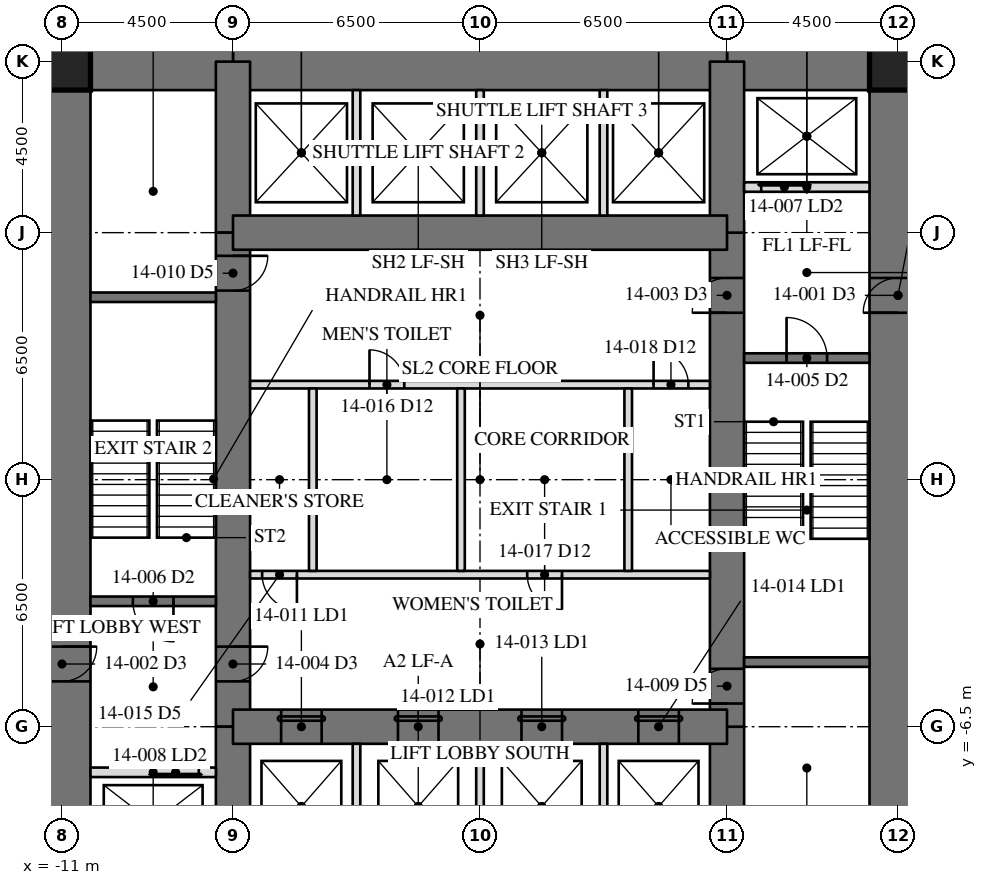
"""IFC4 building model, lengths in metres.
Left out: names, types, materials, properties, quantities, classifications, styles, units other than length and angle.
Written with IfcOpenShell. Run it as: python <this file> out.ifc"""

import sys

from ifc_helpers import new_model, si_unit, direction, frame, frame_2d, origin, origin_2d, place, context, subcontext, project, spatial, rectangle, hollow_rectangle, extrude, element, fill, save


model = new_model("IFC4")
c1 = context("Model", 3, precision=1e-05, world=origin(), true_north=direction((0.0, 1.0)))
c2 = subcontext(c1, "Body", "Model", "MODEL_VIEW")
j1 = project(units=[si_unit("LENGTHUNIT", "METRE"), si_unit("PLANEANGLEUNIT", "RADIAN")], contexts=[c1])
p1 = place(None, origin())
s1 = spatial("IfcSite", under=j1, at=p1, CompositionType="ELEMENT")
p2 = place(p1, origin())
s2 = spatial("IfcBuilding", under=s1, at=p2, CompositionType="ELEMENT")
p3 = place(p2, frame((0.0, 0.0, 61.1)))
s3 = spatial("IfcBuildingStorey", under=s2, at=p3, CompositionType="ELEMENT", Elevation=61.1)
p4 = place(p3, frame((11.0, -11.0, 0.0), z_axis=(0.0, 0.0, 1.0), x_axis=(0.0, 1.0, 0.0)))
e1 = element("IfcWall", 1, at=p4, inside=s3, PredefinedType="SHEAR", context=c2, shape_type="SweptSolid", body=[
    extrude(rectangle(XDim=22.0, YDim=1.5, at=frame_2d((11.0, 0.0))), origin(), (0.0, 0.0, 1.0), 4.1),
])
p5 = place(p4, frame((15.393, 0.0, 0.0)))
e2 = element("IfcOpeningElement", 2, at=p5, cuts=e1, PredefinedType="OPENING", context=c2, shape_type="SweptSolid", body=[
    extrude(rectangle(XDim=0.915, YDim=2.134, at=frame_2d((0.458, 1.067))), frame((0.0, 0.76, 0.0), z_axis=(0.0, -1.0, 0.0), x_axis=(1.0, 0.0, 0.0)), (0.0, 0.0, 1.0), 1.52),
])
p6 = place(p3, frame((-11.0, 11.0, 0.0), z_axis=(0.0, 0.0, 1.0), x_axis=(0.0, -1.0, 0.0)))
e3 = element("IfcWall", 3, at=p6, inside=s3, PredefinedType="SHEAR", context=c2, shape_type="SweptSolid", body=[
    extrude(rectangle(XDim=22.0, YDim=1.5, at=frame_2d((11.0, 0.0))), origin(), (0.0, 0.0, 1.0), 4.1),
])
p7 = place(p6, frame((15.393, 0.0, 0.0)))
e4 = element("IfcOpeningElement", 4, at=p7, cuts=e3, PredefinedType="OPENING", context=c2, shape_type="SweptSolid", body=[
    extrude(rectangle(XDim=0.915, YDim=2.134, at=frame_2d((0.458, 1.067))), frame((0.0, 0.76, 0.0), z_axis=(0.0, -1.0, 0.0), x_axis=(1.0, 0.0, 0.0)), (0.0, 0.0, 1.0), 1.52),
])
p8 = place(p3, frame((11.0, 11.0, 0.0), z_axis=(0.0, 0.0, 1.0), x_axis=(-1.0, 0.0, 0.0)))
e5 = element("IfcWall", 5, at=p8, inside=s3, PredefinedType="SHEAR", context=c2, shape_type="SweptSolid", body=[
    extrude(rectangle(XDim=4.5, YDim=1.5, at=frame_2d((2.25, 0.0))), origin(), (0.0, 0.0, 1.0), 4.1),
])
p9 = place(p3, frame((6.5, 11.0, 0.0), z_axis=(0.0, 0.0, 1.0), x_axis=(-1.0, 0.0, 0.0)))
e6 = element("IfcWall", 6, at=p9, inside=s3, PredefinedType="SHEAR", context=c2, shape_type="SweptSolid", body=[
    extrude(rectangle(XDim=13.0, YDim=1.5, at=frame_2d((6.5, 0.0))), origin(), (0.0, 0.0, 1.0), 4.1),
])
p10 = place(p3, frame((-6.5, 11.0, 0.0), z_axis=(0.0, 0.0, 1.0), x_axis=(-1.0, 0.0, 0.0)))
e7 = element("IfcWall", 7, at=p10, inside=s3, PredefinedType="SHEAR", context=c2, shape_type="SweptSolid", body=[
    extrude(rectangle(XDim=4.5, YDim=1.5, at=frame_2d((2.25, 0.0))), origin(), (0.0, 0.0, 1.0), 4.1),
])
p11 = place(p3, frame((6.5, -11.0, 0.0), z_axis=(0.0, 0.0, 1.0), x_axis=(0.0, 1.0, 0.0)))
e8 = element("IfcWall", 8, at=p11, inside=s3, PredefinedType="SHEAR", context=c2, shape_type="SweptSolid", body=[
    extrude(rectangle(XDim=4.5, YDim=0.9, at=frame_2d((2.25, 0.0))), origin(), (0.0, 0.0, 1.0), 4.1),
])
p12 = place(p3, frame((6.5, -6.5, 0.0), z_axis=(0.0, 0.0, 1.0), x_axis=(0.0, 1.0, 0.0)))
e9 = element("IfcWall", 9, at=p12, inside=s3, PredefinedType="SHEAR", context=c2, shape_type="SweptSolid", body=[
    extrude(rectangle(XDim=13.0, YDim=0.9, at=frame_2d((6.5, 0.0))), origin(), (0.0, 0.0, 1.0), 4.1),
])
p13 = place(p12, frame((10.893, 0.0, 0.0)))
e10 = element("IfcOpeningElement", 10, at=p13, cuts=e9, PredefinedType="OPENING", context=c2, shape_type="SweptSolid", body=[
    extrude(rectangle(XDim=0.915, YDim=2.134, at=frame_2d((0.458, 1.067))), frame((0.0, 0.46, 0.0), z_axis=(0.0, -1.0, 0.0), x_axis=(1.0, 0.0, 0.0)), (0.0, 0.0, 1.0), 0.92),
])
p14 = place(p12, frame((0.61, 0.0, 0.0)))
e11 = element("IfcOpeningElement", 11, at=p14, cuts=e9, PredefinedType="OPENING", context=c2, shape_type="SweptSolid", body=[
    extrude(rectangle(XDim=0.915, YDim=2.134, at=frame_2d((0.458, 1.067))), frame((0.0, 0.46, 0.0), z_axis=(0.0, -1.0, 0.0), x_axis=(1.0, 0.0, 0.0)), (0.0, 0.0, 1.0), 0.92),
])
for number, where, z_axis, x_axis in (
    (12, (6.5, 6.5, 0.0), (0.0, 0.0, 1.0), (0.0, 1.0, 0.0)),
    (13, (-6.5, 11.0, 0.0), (0.0, 0.0, 1.0), (0.0, -1.0, 0.0)),
):
    element("IfcWall", number, at=place(p3, frame(where, z_axis=z_axis, x_axis=x_axis)), inside=s3, PredefinedType="SHEAR", context=c2, shape_type="SweptSolid", body=[
        extrude(rectangle(XDim=4.5, YDim=0.9, at=frame_2d((2.25, 0.0))), origin(), (0.0, 0.0, 1.0), 4.1),
    ])
p15 = place(p3, frame((-6.5, 6.5, 0.0), z_axis=(0.0, 0.0, 1.0), x_axis=(0.0, -1.0, 0.0)))
e14 = element("IfcWall", 14, at=p15, inside=s3, PredefinedType="SHEAR", context=c2, shape_type="SweptSolid", body=[
    extrude(rectangle(XDim=13.0, YDim=0.9, at=frame_2d((6.5, 0.0))), origin(), (0.0, 0.0, 1.0), 4.1),
])
p16 = place(p15, frame((10.893, 0.0, 0.0)))
e15 = element("IfcOpeningElement", 15, at=p16, cuts=e14, PredefinedType="OPENING", context=c2, shape_type="SweptSolid", body=[
    extrude(rectangle(XDim=0.915, YDim=2.134, at=frame_2d((0.458, 1.067))), frame((0.0, 0.46, 0.0), z_axis=(0.0, -1.0, 0.0), x_axis=(1.0, 0.0, 0.0)), (0.0, 0.0, 1.0), 0.92),
])
p17 = place(p15, frame((0.61, 0.0, 0.0)))
e16 = element("IfcOpeningElement", 16, at=p17, cuts=e14, PredefinedType="OPENING", context=c2, shape_type="SweptSolid", body=[
    extrude(rectangle(XDim=0.915, YDim=2.134, at=frame_2d((0.458, 1.067))), frame((0.0, 0.46, 0.0), z_axis=(0.0, -1.0, 0.0), x_axis=(1.0, 0.0, 0.0)), (0.0, 0.0, 1.0), 0.92),
])
p18 = place(p3, frame((-6.5, -6.5, 0.0), z_axis=(0.0, 0.0, 1.0), x_axis=(0.0, -1.0, 0.0)))
e17 = element("IfcWall", 17, at=p18, inside=s3, PredefinedType="SHEAR", context=c2, shape_type="SweptSolid", body=[
    extrude(rectangle(XDim=4.5, YDim=0.9, at=frame_2d((2.25, 0.0))), origin(), (0.0, 0.0, 1.0), 4.1),
])
p19 = place(p3, frame((6.5, 6.5, 0.0), z_axis=(0.0, 0.0, 1.0), x_axis=(-1.0, 0.0, 0.0)))
e18 = element("IfcWall", 18, at=p19, inside=s3, PredefinedType="SHEAR", context=c2, shape_type="SweptSolid", body=[
    extrude(rectangle(XDim=13.0, YDim=0.9, at=frame_2d((6.5, 0.0))), origin(), (0.0, 0.0, 1.0), 4.1),
])
p20 = place(p3, frame((-6.5, -6.5, 0.0), z_axis=(0.0, 0.0, 1.0), x_axis=(1.0, 0.0, 0.0)))
e19 = element("IfcWall", 19, at=p20, inside=s3, PredefinedType="SHEAR", context=c2, shape_type="SweptSolid", body=[
    extrude(rectangle(XDim=13.0, YDim=0.9, at=frame_2d((6.5, 0.0))), origin(), (0.0, 0.0, 1.0), 4.1),
])
p21 = place(p20, frame((1.267, 0.0, 0.0)))
e20 = element("IfcOpeningElement", 20, at=p21, cuts=e19, PredefinedType="OPENING", context=c2, shape_type="SweptSolid", body=[
    extrude(rectangle(XDim=1.067, YDim=2.134, at=frame_2d((0.533, 1.067))), frame((0.0, 0.46, 0.0), z_axis=(0.0, -1.0, 0.0), x_axis=(1.0, 0.0, 0.0)), (0.0, 0.0, 1.0), 0.92),
])
p22 = place(p20, frame((4.342, 0.0, 0.0)))
e21 = element("IfcOpeningElement", 21, at=p22, cuts=e19, PredefinedType="OPENING", context=c2, shape_type="SweptSolid", body=[
    extrude(rectangle(XDim=1.067, YDim=2.134, at=frame_2d((0.533, 1.067))), frame((0.0, 0.46, 0.0), z_axis=(0.0, -1.0, 0.0), x_axis=(1.0, 0.0, 0.0)), (0.0, 0.0, 1.0), 0.92),
])
p23 = place(p20, frame((7.592, 0.0, 0.0)))
e22 = element("IfcOpeningElement", 22, at=p23, cuts=e19, PredefinedType="OPENING", context=c2, shape_type="SweptSolid", body=[
    extrude(rectangle(XDim=1.067, YDim=2.134, at=frame_2d((0.533, 1.067))), frame((0.0, 0.46, 0.0), z_axis=(0.0, -1.0, 0.0), x_axis=(1.0, 0.0, 0.0)), (0.0, 0.0, 1.0), 0.92),
])
p24 = place(p20, frame((10.667, 0.0, 0.0)))
e23 = element("IfcOpeningElement", 23, at=p24, cuts=e19, PredefinedType="OPENING", context=c2, shape_type="SweptSolid", body=[
    extrude(rectangle(XDim=1.067, YDim=2.134, at=frame_2d((0.533, 1.067))), frame((0.0, 0.46, 0.0), z_axis=(0.0, -1.0, 0.0), x_axis=(1.0, 0.0, 0.0)), (0.0, 0.0, 1.0), 0.92),
])
for number, where, z_axis, x_axis in (
    (24, (11.0, 11.0, 0.0), (0.0, 0.0, 1.0), (1.0, 0.0, 0.0)),
    (25, (-11.0, 11.0, 0.0), (0.0, 0.0, 1.0), (1.0, 0.0, 0.0)),
):
    element("IfcColumn", number, at=place(p3, frame(where, z_axis=z_axis, x_axis=x_axis)), inside=s3, PredefinedType="COLUMN", context=c2, shape_type="SweptSolid", body=[
        extrude(hollow_rectangle(XDim=1.499, YDim=1.499, WallThickness=0.102, at=origin_2d()), origin(), (0.0, 0.0, 1.0), 4.1),
    ])
for number, where, z_axis, x_axis in (
    (26, (6.95, -4.8, 0.0), (0.0, 0.0, 1.0), (1.0, 0.0, 0.0)),
    (27, (-6.95, 4.8, 0.0), (0.0, 0.0, 1.0), (-1.0, 0.0, 0.0)),
):
    element("IfcWall", number, at=place(p3, frame(where, z_axis=z_axis, x_axis=x_axis)), inside=s3, PredefinedType="SOLIDWALL", context=c2, shape_type="SweptSolid", body=[
        extrude(rectangle(XDim=3.3, YDim=0.25, at=frame_2d((1.65, 0.0))), origin(), (0.0, 0.0, 1.0), 3.91),
    ])
p25 = place(p3, frame((6.95, 3.2, 0.0), z_axis=(0.0, 0.0, 1.0), x_axis=(1.0, 0.0, 0.0)))
e28 = element("IfcWall", 28, at=p25, inside=s3, PredefinedType="SOLIDWALL", context=c2, shape_type="SweptSolid", body=[
    extrude(rectangle(XDim=3.3, YDim=0.25, at=frame_2d((1.65, 0.0))), origin(), (0.0, 0.0, 1.0), 3.91),
])
p26 = place(p25, frame((1.116, 0.0, 0.0)))
e29 = element("IfcOpeningElement", 29, at=p26, cuts=e28, PredefinedType="OPENING", context=c2, shape_type="SweptSolid", body=[
    extrude(rectangle(XDim=1.067, YDim=2.134, at=frame_2d((0.533, 1.067))), frame((0.0, 0.135, 0.0), z_axis=(0.0, -1.0, 0.0), x_axis=(1.0, 0.0, 0.0)), (0.0, 0.0, 1.0), 0.27),
])
p27 = place(p3, frame((-6.95, -3.2, 0.0), z_axis=(0.0, 0.0, 1.0), x_axis=(-1.0, 0.0, 0.0)))
e30 = element("IfcWall", 30, at=p27, inside=s3, PredefinedType="SOLIDWALL", context=c2, shape_type="SweptSolid", body=[
    extrude(rectangle(XDim=3.3, YDim=0.25, at=frame_2d((1.65, 0.0))), origin(), (0.0, 0.0, 1.0), 3.91),
])
p28 = place(p27, frame((1.116, 0.0, 0.0)))
e31 = element("IfcOpeningElement", 31, at=p28, cuts=e30, PredefinedType="OPENING", context=c2, shape_type="SweptSolid", body=[
    extrude(rectangle(XDim=1.067, YDim=2.134, at=frame_2d((0.533, 1.067))), frame((0.0, 0.135, 0.0), z_axis=(0.0, -1.0, 0.0), x_axis=(1.0, 0.0, 0.0)), (0.0, 0.0, 1.0), 0.27),
])
p29 = place(p3, frame((6.95, 7.7, 0.0), z_axis=(0.0, 0.0, 1.0), x_axis=(1.0, 0.0, 0.0)))
e32 = element("IfcWall", 32, at=p29, inside=s3, PredefinedType="PARTITIONING", context=c2, shape_type="SweptSolid", body=[
    extrude(rectangle(XDim=3.3, YDim=0.25, at=frame_2d((1.65, 0.0))), origin(), (0.0, 0.0, 1.0), 3.91),
])
p30 = place(p29, frame((0.45, 0.0, 0.0)))
e33 = element("IfcOpeningElement", 33, at=p30, cuts=e32, PredefinedType="OPENING", context=c2, shape_type="SweptSolid", body=[
    extrude(rectangle(XDim=1.219, YDim=2.134, at=frame_2d((0.609, 1.067))), frame((0.0, 0.135, 0.0), z_axis=(0.0, -1.0, 0.0), x_axis=(1.0, 0.0, 0.0)), (0.0, 0.0, 1.0), 0.27),
])
p31 = place(p3, frame((-6.95, -7.7, 0.0), z_axis=(0.0, 0.0, 1.0), x_axis=(-1.0, 0.0, 0.0)))
e34 = element("IfcWall", 34, at=p31, inside=s3, PredefinedType="PARTITIONING", context=c2, shape_type="SweptSolid", body=[
    extrude(rectangle(XDim=3.3, YDim=0.25, at=frame_2d((1.65, 0.0))), origin(), (0.0, 0.0, 1.0), 3.91),
])
p32 = place(p31, frame((0.45, 0.0, 0.0)))
e35 = element("IfcOpeningElement", 35, at=p32, cuts=e34, PredefinedType="OPENING", context=c2, shape_type="SweptSolid", body=[
    extrude(rectangle(XDim=1.219, YDim=2.134, at=frame_2d((0.609, 1.067))), frame((0.0, 0.135, 0.0), z_axis=(0.0, -1.0, 0.0), x_axis=(1.0, 0.0, 0.0)), (0.0, 0.0, 1.0), 0.27),
])
p33 = place(p3, frame((-6.05, 2.5, 0.0), z_axis=(0.0, 0.0, 1.0), x_axis=(1.0, 0.0, 0.0)))
e36 = element("IfcWall", 36, at=p33, inside=s3, PredefinedType="PARTITIONING", context=c2, shape_type="SweptSolid", body=[
    extrude(rectangle(XDim=12.1, YDim=0.2, at=frame_2d((6.05, 0.0))), origin(), (0.0, 0.0, 1.0), 3.91),
])
p34 = place(p33, frame((3.143, 0.0, 0.0)))
e37 = element("IfcOpeningElement", 37, at=p34, cuts=e36, PredefinedType="OPENING", context=c2, shape_type="SweptSolid", body=[
    extrude(rectangle(XDim=0.915, YDim=2.134, at=frame_2d((0.458, 1.067))), frame((0.0, 0.11, 0.0), z_axis=(0.0, -1.0, 0.0), x_axis=(1.0, 0.0, 0.0)), (0.0, 0.0, 1.0), 0.22),
])
p35 = place(p33, frame((10.617, 0.0, 0.0)))
e38 = element("IfcOpeningElement", 38, at=p35, cuts=e36, PredefinedType="OPENING", context=c2, shape_type="SweptSolid", body=[
    extrude(rectangle(XDim=0.915, YDim=2.134, at=frame_2d((0.458, 1.067))), frame((0.0, 0.11, 0.0), z_axis=(0.0, -1.0, 0.0), x_axis=(1.0, 0.0, 0.0)), (0.0, 0.0, 1.0), 0.22),
])
p36 = place(p3, frame((6.05, -2.5, 0.0), z_axis=(0.0, 0.0, 1.0), x_axis=(-1.0, 0.0, 0.0)))
e39 = element("IfcWall", 39, at=p36, inside=s3, PredefinedType="PARTITIONING", context=c2, shape_type="SweptSolid", body=[
    extrude(rectangle(XDim=12.1, YDim=0.2, at=frame_2d((6.05, 0.0))), origin(), (0.0, 0.0, 1.0), 3.91),
])
p37 = place(p36, frame((10.867, 0.0, 0.0)))
e40 = element("IfcOpeningElement", 40, at=p37, cuts=e39, PredefinedType="OPENING", context=c2, shape_type="SweptSolid", body=[
    extrude(rectangle(XDim=0.915, YDim=2.134, at=frame_2d((0.458, 1.067))), frame((0.0, 0.11, 0.0), z_axis=(0.0, -1.0, 0.0), x_axis=(1.0, 0.0, 0.0)), (0.0, 0.0, 1.0), 0.22),
])
p38 = place(p36, frame((3.893, 0.0, 0.0)))
e41 = element("IfcOpeningElement", 41, at=p38, cuts=e39, PredefinedType="OPENING", context=c2, shape_type="SweptSolid", body=[
    extrude(rectangle(XDim=0.915, YDim=2.134, at=frame_2d((0.458, 1.067))), frame((0.0, 0.11, 0.0), z_axis=(0.0, -1.0, 0.0), x_axis=(1.0, 0.0, 0.0)), (0.0, 0.0, 1.0), 0.22),
])
for number, where, z_axis, x_axis in (
    (42, (-3.25, 6.95, 0.0), (0.0, 0.0, 1.0), (0.0, 1.0, 0.0)),
    (43, (0.0, 6.95, 0.0), (0.0, 0.0, 1.0), (0.0, 1.0, 0.0)),
    (44, (3.25, 6.95, 0.0), (0.0, 0.0, 1.0), (0.0, 1.0, 0.0)),
    (45, (-3.25, -10.25, 0.0), (0.0, 0.0, 1.0), (0.0, 1.0, 0.0)),
    (46, (0.0, -10.25, 0.0), (0.0, 0.0, 1.0), (0.0, 1.0, 0.0)),
    (47, (3.25, -10.25, 0.0), (0.0, 0.0, 1.0), (0.0, 1.0, 0.0)),
):
    element("IfcWall", number, at=place(p3, frame(where, z_axis=z_axis, x_axis=x_axis)), inside=s3, PredefinedType="PARTITIONING", context=c2, shape_type="SweptSolid", body=[
        extrude(rectangle(XDim=3.3, YDim=0.2, at=frame_2d((1.65, 0.0))), origin(), (0.0, 0.0, 1.0), 3.91),
    ])
for number, where, z_axis, x_axis in (
    (48, (-4.4, -2.4, 0.0), (0.0, 0.0, 1.0), (0.0, 1.0, 0.0)),
    (49, (-0.5, -2.4, 0.0), (0.0, 0.0, 1.0), (0.0, 1.0, 0.0)),
    (50, (3.9, -2.4, 0.0), (0.0, 0.0, 1.0), (0.0, 1.0, 0.0)),
):
    element("IfcWall", number, at=place(p3, frame(where, z_axis=z_axis, x_axis=x_axis)), inside=s3, PredefinedType="PARTITIONING", context=c2, shape_type="SweptSolid", body=[
        extrude(rectangle(XDim=4.8, YDim=0.2, at=frame_2d((2.4, 0.0))), origin(), (0.0, 0.0, 1.0), 3.91),
    ])
p39 = place(p13, origin())
e51 = element("IfcDoor", 51, at=p39, inside=s3, OperationType="SINGLE_SWING_RIGHT", PredefinedType="DOOR", context=c2, shape_type="SweptSolid", body=[
    extrude(rectangle(XDim=0.915, YDim=2.134, at=frame_2d((0.458, 1.067))), frame((0.0, -0.375, 0.0), z_axis=(0.0, -1.0, 0.0), x_axis=(1.0, 0.0, 0.0)), (0.0, 0.0, 1.0), 0.05),
])
fill(e10, e51)
p40 = place(p16, origin())
e52 = element("IfcDoor", 52, at=p40, inside=s3, OperationType="SINGLE_SWING_RIGHT", PredefinedType="DOOR", context=c2, shape_type="SweptSolid", body=[
    extrude(rectangle(XDim=0.915, YDim=2.134, at=frame_2d((0.458, 1.067))), frame((0.0, -0.375, 0.0), z_axis=(0.0, -1.0, 0.0), x_axis=(1.0, 0.0, 0.0)), (0.0, 0.0, 1.0), 0.05),
])
fill(e15, e52)
p41 = place(p26, origin())
e53 = element("IfcDoor", 53, at=p41, inside=s3, OperationType="SINGLE_SWING_LEFT", PredefinedType="DOOR", context=c2, shape_type="SweptSolid", body=[
    extrude(rectangle(XDim=1.067, YDim=2.134, at=frame_2d((0.533, 1.067))), frame((0.0, 0.025, 0.0), z_axis=(0.0, -1.0, 0.0), x_axis=(1.0, 0.0, 0.0)), (0.0, 0.0, 1.0), 0.05),
])
fill(e29, e53)
p42 = place(p28, origin())
e54 = element("IfcDoor", 54, at=p42, inside=s3, OperationType="SINGLE_SWING_LEFT", PredefinedType="DOOR", context=c2, shape_type="SweptSolid", body=[
    extrude(rectangle(XDim=1.067, YDim=2.134, at=frame_2d((0.533, 1.067))), frame((0.0, 0.025, 0.0), z_axis=(0.0, -1.0, 0.0), x_axis=(1.0, 0.0, 0.0)), (0.0, 0.0, 1.0), 0.05),
])
fill(e31, e54)
p43 = place(p30, origin())
e55 = element("IfcDoor", 55, at=p43, inside=s3, OperationType="SLIDING_TO_LEFT", PredefinedType="DOOR", context=c2, shape_type="SweptSolid", body=[
    extrude(rectangle(XDim=1.219, YDim=2.134, at=frame_2d((0.609, 1.067))), frame((0.0, 0.025, 0.0), z_axis=(0.0, -1.0, 0.0), x_axis=(1.0, 0.0, 0.0)), (0.0, 0.0, 1.0), 0.05),
])
fill(e33, e55)
p44 = place(p32, origin())
e56 = element("IfcDoor", 56, at=p44, inside=s3, OperationType="SLIDING_TO_LEFT", PredefinedType="DOOR", context=c2, shape_type="SweptSolid", body=[
    extrude(rectangle(XDim=1.219, YDim=2.134, at=frame_2d((0.609, 1.067))), frame((0.0, 0.025, 0.0), z_axis=(0.0, -1.0, 0.0), x_axis=(1.0, 0.0, 0.0)), (0.0, 0.0, 1.0), 0.05),
])
fill(e35, e56)
p45 = place(p14, origin())
e57 = element("IfcDoor", 57, at=p45, inside=s3, OperationType="SINGLE_SWING_RIGHT", PredefinedType="DOOR", context=c2, shape_type="SweptSolid", body=[
    extrude(rectangle(XDim=0.915, YDim=2.134, at=frame_2d((0.458, 1.067))), frame((0.0, -0.375, 0.0), z_axis=(0.0, -1.0, 0.0), x_axis=(1.0, 0.0, 0.0)), (0.0, 0.0, 1.0), 0.05),
])
fill(e11, e57)
p46 = place(p17, origin())
e58 = element("IfcDoor", 58, at=p46, inside=s3, OperationType="SINGLE_SWING_RIGHT", PredefinedType="DOOR", context=c2, shape_type="SweptSolid", body=[
    extrude(rectangle(XDim=0.915, YDim=2.134, at=frame_2d((0.458, 1.067))), frame((0.0, -0.375, 0.0), z_axis=(0.0, -1.0, 0.0), x_axis=(1.0, 0.0, 0.0)), (0.0, 0.0, 1.0), 0.05),
])
fill(e16, e58)
p47 = place(p21, origin())
e59 = element("IfcDoor", 59, at=p47, inside=s3, OperationType="SLIDING_TO_LEFT", PredefinedType="DOOR", context=c2, shape_type="SweptSolid", body=[
    extrude(rectangle(XDim=1.067, YDim=2.134, at=frame_2d((0.533, 1.067))), frame((0.0, -0.375, 0.0), z_axis=(0.0, -1.0, 0.0), x_axis=(1.0, 0.0, 0.0)), (0.0, 0.0, 1.0), 0.05),
])
fill(e20, e59)
p48 = place(p22, origin())
e60 = element("IfcDoor", 60, at=p48, inside=s3, OperationType="SLIDING_TO_LEFT", PredefinedType="DOOR", context=c2, shape_type="SweptSolid", body=[
    extrude(rectangle(XDim=1.067, YDim=2.134, at=frame_2d((0.533, 1.067))), frame((0.0, -0.375, 0.0), z_axis=(0.0, -1.0, 0.0), x_axis=(1.0, 0.0, 0.0)), (0.0, 0.0, 1.0), 0.05),
])
fill(e21, e60)
p49 = place(p23, origin())
e61 = element("IfcDoor", 61, at=p49, inside=s3, OperationType="SLIDING_TO_LEFT", PredefinedType="DOOR", context=c2, shape_type="SweptSolid", body=[
    extrude(rectangle(XDim=1.067, YDim=2.134, at=frame_2d((0.533, 1.067))), frame((0.0, -0.375, 0.0), z_axis=(0.0, -1.0, 0.0), x_axis=(1.0, 0.0, 0.0)), (0.0, 0.0, 1.0), 0.05),
])
fill(e22, e61)
p50 = place(p24, origin())
e62 = element("IfcDoor", 62, at=p50, inside=s3, OperationType="SLIDING_TO_LEFT", PredefinedType="DOOR", context=c2, shape_type="SweptSolid", body=[
    extrude(rectangle(XDim=1.067, YDim=2.134, at=frame_2d((0.533, 1.067))), frame((0.0, -0.375, 0.0), z_axis=(0.0, -1.0, 0.0), x_axis=(1.0, 0.0, 0.0)), (0.0, 0.0, 1.0), 0.05),
])
fill(e23, e62)
p51 = place(p37, origin())
e63 = element("IfcDoor", 63, at=p51, inside=s3, OperationType="SINGLE_SWING_RIGHT", PredefinedType="DOOR", context=c2, shape_type="SweptSolid", body=[
    extrude(rectangle(XDim=0.915, YDim=2.134, at=frame_2d((0.458, 1.067))), frame((0.0, 0.025, 0.0), z_axis=(0.0, -1.0, 0.0), x_axis=(1.0, 0.0, 0.0)), (0.0, 0.0, 1.0), 0.05),
])
fill(e40, e63)
p52 = place(p34, origin())
e64 = element("IfcDoor", 64, at=p52, inside=s3, OperationType="SINGLE_SWING_LEFT", PredefinedType="DOOR", context=c2, shape_type="SweptSolid", body=[
    extrude(rectangle(XDim=0.915, YDim=2.134, at=frame_2d((0.458, 1.067))), frame((0.0, 0.025, 0.0), z_axis=(0.0, -1.0, 0.0), x_axis=(1.0, 0.0, 0.0)), (0.0, 0.0, 1.0), 0.05),
])
fill(e37, e64)
p53 = place(p38, origin())
e65 = element("IfcDoor", 65, at=p53, inside=s3, OperationType="SINGLE_SWING_LEFT", PredefinedType="DOOR", context=c2, shape_type="SweptSolid", body=[
    extrude(rectangle(XDim=0.915, YDim=2.134, at=frame_2d((0.458, 1.067))), frame((0.0, 0.025, 0.0), z_axis=(0.0, -1.0, 0.0), x_axis=(1.0, 0.0, 0.0)), (0.0, 0.0, 1.0), 0.05),
])
fill(e41, e65)
p54 = place(p35, origin())
e66 = element("IfcDoor", 66, at=p54, inside=s3, OperationType="SINGLE_SWING_LEFT", PredefinedType="DOOR", context=c2, shape_type="SweptSolid", body=[
    extrude(rectangle(XDim=0.915, YDim=2.134, at=frame_2d((0.458, 1.067))), frame((0.0, 0.025, 0.0), z_axis=(0.0, -1.0, 0.0), x_axis=(1.0, 0.0, 0.0)), (0.0, 0.0, 1.0), 0.05),
])
fill(e38, e66)
save(model, sys.argv[1])
